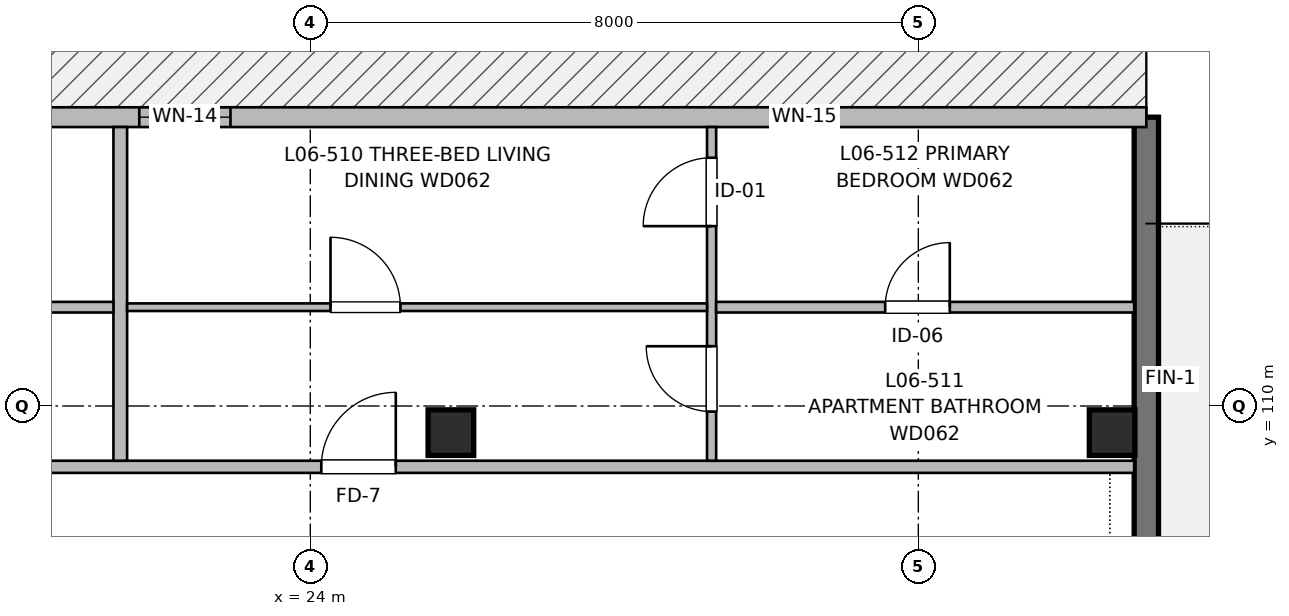
"""IFC4 building model, lengths in metres.
Left out: names, types, materials, properties, quantities, classifications, styles, units other than length and angle.
Written with IfcOpenShell. Run it as: python <this file> out.ifc"""

import sys

from ifc_helpers import new_model, si_unit, direction, frame, frame_2d, origin, origin_2d, place, context, subcontext, project, spatial, rectangle, extrude, element, fill, save


model = new_model("IFC4")
c1 = context("Model", 3, precision=1e-05, world=origin(), true_north=direction((0.0, 1.0)))
c2 = subcontext(c1, "Body", "Model", "MODEL_VIEW")
j1 = project(units=[si_unit("LENGTHUNIT", "METRE"), si_unit("PLANEANGLEUNIT", "RADIAN")], contexts=[c1])
p1 = place(None, origin())
s1 = spatial("IfcSite", under=j1, at=p1, CompositionType="ELEMENT")
p2 = place(p1, origin())
s2 = spatial("IfcBuilding", under=s1, at=p2, CompositionType="ELEMENT")
p3 = place(p2, frame((0.0, 0.0, 20.16)))
s3 = spatial("IfcBuildingStorey", under=s2, at=p3, CompositionType="ELEMENT", Elevation=20.16)
for number, where, z_axis, x_axis in (
    (1, (25.85, 109.65, 0.0), (0.0, 0.0, 1.0), (1.0, 0.0, 0.0)),
    (2, (34.55, 109.65, 0.0), (0.0, 0.0, 1.0), (1.0, 0.0, 0.0)),
):
    element("IfcColumn", number, at=place(p3, frame(where, z_axis=z_axis, x_axis=x_axis)), inside=s3, PredefinedType="COLUMN", context=c2, shape_type="SweptSolid", body=[
        extrude(rectangle(XDim=0.6, YDim=0.6, at=origin_2d()), origin(), (0.0, 0.0, 1.0), 3.2),
    ])
p4 = place(p3, frame((35.0, 113.8, 0.0), z_axis=(0.0, 0.0, 1.0), x_axis=(0.0, -1.0, 0.0)))
e3 = element("IfcWall", 3, at=p4, inside=s3, PredefinedType="SHEAR", context=c2, shape_type="SweptSolid", body=[
    extrude(rectangle(XDim=13.8, YDim=0.32, at=frame_2d((6.9, 0.0))), origin(), (0.0, 0.0, 1.0), 2.98),
])
p5 = place(p4, frame((6.3, 0.0, 0.0)))
e4 = element("IfcOpeningElement", 4, at=p5, cuts=e3, PredefinedType="OPENING", context=c2, shape_type="SweptSolid", body=[
    extrude(rectangle(XDim=1.2, YDim=2.2, at=frame_2d((0.6, 1.1))), frame((0.0, 0.17, 0.0), z_axis=(0.0, -1.0, 0.0), x_axis=(1.0, 0.0, 0.0)), (0.0, 0.0, 1.0), 0.34),
])
p6 = place(p4, frame((8.2, 0.0, 0.57)))
e5 = element("IfcOpeningElement", 5, at=p6, cuts=e3, PredefinedType="OPENING", context=c2, shape_type="SweptSolid", body=[
    extrude(rectangle(XDim=2.3, YDim=1.65, at=frame_2d((1.15, 0.825))), frame((0.0, 0.17, 0.0), z_axis=(0.0, -1.0, 0.0), x_axis=(1.0, 0.0, 0.0)), (0.0, 0.0, 1.0), 0.34),
])
p7 = place(p3, frame((8.0, 113.8, 0.0), z_axis=(0.0, 0.0, 1.0), x_axis=(1.0, 0.0, 0.0)))
e6 = element("IfcWall", 6, at=p7, inside=s3, PredefinedType="SOLIDWALL", context=c2, shape_type="SweptSolid", body=[
    extrude(rectangle(XDim=27.0, YDim=0.26, at=frame_2d((13.5, 0.0))), origin(), (0.0, 0.0, 1.0), 2.98),
])
p8 = place(p7, frame((5.5, 0.0, 0.0)))
e7 = element("IfcOpeningElement", 7, at=p8, cuts=e6, PredefinedType="OPENING", context=c2, shape_type="SweptSolid", body=[
    extrude(rectangle(XDim=1.35, YDim=2.2, at=frame_2d((0.675, 1.1))), frame((0.0, 0.14, 0.0), z_axis=(0.0, -1.0, 0.0), x_axis=(1.0, 0.0, 0.0)), (0.0, 0.0, 1.0), 0.28),
])
p9 = place(p7, frame((3.975, 0.0, 0.9)))
e8 = element("IfcOpeningElement", 8, at=p9, cuts=e6, PredefinedType="OPENING", context=c2, shape_type="SweptSolid", body=[
    extrude(rectangle(XDim=1.05, YDim=1.15, at=frame_2d((0.525, 0.575))), frame((0.0, 0.14, 0.0), z_axis=(0.0, -1.0, 0.0), x_axis=(1.0, 0.0, 0.0)), (0.0, 0.0, 1.0), 0.28),
])
p10 = place(p7, frame((13.75, 0.0, 0.9)))
e9 = element("IfcOpeningElement", 9, at=p10, cuts=e6, PredefinedType="OPENING", context=c2, shape_type="SweptSolid", body=[
    extrude(rectangle(XDim=1.2, YDim=1.05, at=frame_2d((0.6, 0.525))), frame((0.0, 0.14, 0.0), z_axis=(0.0, -1.0, 0.0), x_axis=(1.0, 0.0, 0.0)), (0.0, 0.0, 1.0), 0.28),
])
p11 = place(p7, frame((22.175, 0.0, 0.9)))
e10 = element("IfcOpeningElement", 10, at=p11, cuts=e6, PredefinedType="OPENING", context=c2, shape_type="SweptSolid", body=[
    extrude(rectangle(XDim=0.65, YDim=0.95, at=frame_2d((0.325, 0.475))), frame((0.0, 0.14, 0.0), z_axis=(0.0, -1.0, 0.0), x_axis=(1.0, 0.0, 0.0)), (0.0, 0.0, 1.0), 0.28),
])
p12 = place(p7, frame((9.9, 0.0, 0.82)))
e11 = element("IfcOpeningElement", 11, at=p12, cuts=e6, PredefinedType="OPENING", context=c2, shape_type="SweptSolid", body=[
    extrude(rectangle(XDim=1.5, YDim=1.4, at=frame_2d((0.75, 0.7))), frame((0.0, 0.14, 0.0), z_axis=(0.0, -1.0, 0.0), x_axis=(1.0, 0.0, 0.0)), (0.0, 0.0, 1.0), 0.28),
])
p13 = place(p3, frame((8.16, 109.2, 0.0), z_axis=(0.0, 0.0, 1.0), x_axis=(1.0, 0.0, 0.0)))
e12 = element("IfcWall", 12, at=p13, inside=s3, PredefinedType="PARTITIONING", context=c2, shape_type="SweptSolid", body=[
    extrude(rectangle(XDim=26.68, YDim=0.16, at=frame_2d((13.34, 0.0))), origin(), (0.0, 0.0, 1.0), 2.935),
])
p14 = place(p13, frame((3.35, 0.0, 0.0)))
e13 = element("IfcOpeningElement", 13, at=p14, cuts=e12, PredefinedType="OPENING", context=c2, shape_type="SweptSolid", body=[
    extrude(rectangle(XDim=0.98, YDim=2.15, at=frame_2d((0.49, 1.075))), frame((0.0, 0.09, 0.0), z_axis=(0.0, -1.0, 0.0), x_axis=(1.0, 0.0, 0.0)), (0.0, 0.0, 1.0), 0.18),
])
p15 = place(p13, frame((15.985, 0.0, 0.0)))
e14 = element("IfcOpeningElement", 14, at=p15, cuts=e12, PredefinedType="OPENING", context=c2, shape_type="SweptSolid", body=[
    extrude(rectangle(XDim=0.98, YDim=2.15, at=frame_2d((0.49, 1.075))), frame((0.0, 0.09, 0.0), z_axis=(0.0, -1.0, 0.0), x_axis=(1.0, 0.0, 0.0)), (0.0, 0.0, 1.0), 0.18),
])
p16 = place(p3, frame((21.5, 109.28, 0.0), z_axis=(0.0, 0.0, 1.0), x_axis=(0.0, 1.0, 0.0)))
e15 = element("IfcWall", 15, at=p16, inside=s3, PredefinedType="PARTITIONING", context=c2, shape_type="SweptSolid", body=[
    extrude(rectangle(XDim=4.39, YDim=0.18, at=frame_2d((2.195, 0.0))), origin(), (0.0, 0.0, 1.0), 2.935),
])
p17 = place(p3, frame((15.9, 111.3, 0.0), z_axis=(0.0, 0.0, 1.0), x_axis=(1.0, 0.0, 0.0)))
e16 = element("IfcWall", 16, at=p17, inside=s3, PredefinedType="PARTITIONING", context=c2, shape_type="SweptSolid", body=[
    extrude(rectangle(XDim=5.51, YDim=0.14, at=frame_2d((2.755, 0.0))), origin(), (0.0, 0.0, 1.0), 2.935),
])
p18 = place(p17, frame((2.228, 0.0, 0.0)))
e17 = element("IfcOpeningElement", 17, at=p18, cuts=e16, PredefinedType="OPENING", context=c2, shape_type="SweptSolid", body=[
    extrude(rectangle(XDim=0.85, YDim=2.05, at=frame_2d((0.425, 1.025))), frame((0.0, 0.08, 0.0), z_axis=(0.0, -1.0, 0.0), x_axis=(1.0, 0.0, 0.0)), (0.0, 0.0, 1.0), 0.16),
])
p19 = place(p3, frame((29.28, 109.28, 0.0), z_axis=(0.0, 0.0, 1.0), x_axis=(0.0, 1.0, 0.0)))
e18 = element("IfcWall", 18, at=p19, inside=s3, PredefinedType="PARTITIONING", context=c2, shape_type="SweptSolid", body=[
    extrude(rectangle(XDim=4.39, YDim=0.12, at=frame_2d((2.195, 0.0))), origin(), (0.0, 0.0, 1.0), 2.935),
])
p20 = place(p19, frame((0.646, 0.0, 0.0)))
e19 = element("IfcOpeningElement", 19, at=p20, cuts=e18, PredefinedType="OPENING", context=c2, shape_type="SweptSolid", body=[
    extrude(rectangle(XDim=0.86, YDim=2.1, at=frame_2d((0.43, 1.05))), frame((0.0, 0.07, 0.0), z_axis=(0.0, -1.0, 0.0), x_axis=(1.0, 0.0, 0.0)), (0.0, 0.0, 1.0), 0.14),
])
p21 = place(p19, frame((3.086, 0.0, 0.0)))
e20 = element("IfcOpeningElement", 20, at=p21, cuts=e18, PredefinedType="OPENING", context=c2, shape_type="SweptSolid", body=[
    extrude(rectangle(XDim=0.9, YDim=2.1, at=frame_2d((0.45, 1.05))), frame((0.0, 0.07, 0.0), z_axis=(0.0, -1.0, 0.0), x_axis=(1.0, 0.0, 0.0)), (0.0, 0.0, 1.0), 0.14),
])
p22 = place(p3, frame((29.34, 111.3, 0.0), z_axis=(0.0, 0.0, 1.0), x_axis=(1.0, 0.0, 0.0)))
e21 = element("IfcWall", 21, at=p22, inside=s3, PredefinedType="PARTITIONING", context=c2, shape_type="SweptSolid", body=[
    extrude(rectangle(XDim=5.5, YDim=0.14, at=frame_2d((2.75, 0.0))), origin(), (0.0, 0.0, 1.0), 2.935),
])
p23 = place(p22, frame((2.224, 0.0, 0.0)))
e22 = element("IfcOpeningElement", 22, at=p23, cuts=e21, PredefinedType="OPENING", context=c2, shape_type="SweptSolid", body=[
    extrude(rectangle(XDim=0.85, YDim=2.05, at=frame_2d((0.425, 1.025))), frame((0.0, 0.08, 0.0), z_axis=(0.0, -1.0, 0.0), x_axis=(1.0, 0.0, 0.0)), (0.0, 0.0, 1.0), 0.16),
])
p24 = place(p3, frame((21.59, 111.3, 0.0), z_axis=(0.0, 0.0, 1.0), x_axis=(1.0, 0.0, 0.0)))
e23 = element("IfcWall", 23, at=p24, inside=s3, PredefinedType="PARTITIONING", context=c2, shape_type="SweptSolid", body=[
    extrude(rectangle(XDim=7.63, YDim=0.1, at=frame_2d((3.815, 0.0))), origin(), (0.0, 0.0, 1.0), 2.935),
])
p25 = place(p24, frame((2.676, 0.0, 0.0)))
e24 = element("IfcOpeningElement", 24, at=p25, cuts=e23, PredefinedType="OPENING", context=c2, shape_type="SweptSolid", body=[
    extrude(rectangle(XDim=0.92, YDim=2.1, at=frame_2d((0.46, 1.05))), frame((0.0, 0.06, 0.0), z_axis=(0.0, -1.0, 0.0), x_axis=(1.0, 0.0, 0.0)), (0.0, 0.0, 1.0), 0.12),
])
p26 = place(p10, origin())
e25 = element("IfcWindow", 25, at=p26, inside=s3, PartitioningType="SINGLE_PANEL", PredefinedType="WINDOW", context=c2, shape_type="SweptSolid", body=[
    extrude(rectangle(XDim=1.2, YDim=1.05, at=frame_2d((0.6, 0.525))), frame((0.0, 0.03, 0.0), z_axis=(0.0, -1.0, 0.0), x_axis=(1.0, 0.0, 0.0)), (0.0, 0.0, 1.0), 0.06),
])
fill(e9, e25)
p27 = place(p11, origin())
e26 = element("IfcWindow", 26, at=p27, inside=s3, PartitioningType="SINGLE_PANEL", PredefinedType="WINDOW", context=c2, shape_type="SweptSolid", body=[
    extrude(rectangle(XDim=0.65, YDim=0.95, at=frame_2d((0.325, 0.475))), frame((0.0, 0.03, 0.0), z_axis=(0.0, -1.0, 0.0), x_axis=(1.0, 0.0, 0.0)), (0.0, 0.0, 1.0), 0.06),
])
fill(e10, e26)
p28 = place(p15, origin())
e27 = element("IfcDoor", 27, at=p28, inside=s3, OperationType="SINGLE_SWING_RIGHT", PredefinedType="DOOR", context=c2, shape_type="SweptSolid", body=[
    extrude(rectangle(XDim=0.98, YDim=2.15, at=frame_2d((0.49, 1.075))), frame((0.0, 0.025, 0.0), z_axis=(0.0, -1.0, 0.0), x_axis=(1.0, 0.0, 0.0)), (0.0, 0.0, 1.0), 0.05),
])
fill(e14, e27)
p29 = place(p25, origin())
e28 = element("IfcDoor", 28, at=p29, inside=s3, OperationType="SINGLE_SWING_LEFT", PredefinedType="DOOR", context=c2, shape_type="SweptSolid", body=[
    extrude(rectangle(XDim=0.92, YDim=2.1, at=frame_2d((0.46, 1.05))), frame((0.0, 0.025, 0.0), z_axis=(0.0, -1.0, 0.0), x_axis=(1.0, 0.0, 0.0)), (0.0, 0.0, 1.0), 0.05),
])
fill(e24, e28)
p30 = place(p20, origin())
e29 = element("IfcDoor", 29, at=p30, inside=s3, OperationType="SINGLE_SWING_RIGHT", PredefinedType="DOOR", context=c2, shape_type="SweptSolid", body=[
    extrude(rectangle(XDim=0.86, YDim=2.1, at=frame_2d((0.43, 1.05))), frame((0.0, 0.025, 0.0), z_axis=(0.0, -1.0, 0.0), x_axis=(1.0, 0.0, 0.0)), (0.0, 0.0, 1.0), 0.05),
])
fill(e19, e29)
p31 = place(p21, origin())
e30 = element("IfcDoor", 30, at=p31, inside=s3, OperationType="SINGLE_SWING_LEFT", PredefinedType="DOOR", context=c2, shape_type="SweptSolid", body=[
    extrude(rectangle(XDim=0.9, YDim=2.1, at=frame_2d((0.45, 1.05))), frame((0.0, 0.025, 0.0), z_axis=(0.0, -1.0, 0.0), x_axis=(1.0, 0.0, 0.0)), (0.0, 0.0, 1.0), 0.05),
])
fill(e20, e30)
p32 = place(p23, origin())
e31 = element("IfcDoor", 31, at=p32, inside=s3, OperationType="SINGLE_SWING_RIGHT", PredefinedType="DOOR", context=c2, shape_type="SweptSolid", body=[
    extrude(rectangle(XDim=0.85, YDim=2.05, at=frame_2d((0.425, 1.025))), frame((0.0, 0.025, 0.0), z_axis=(0.0, -1.0, 0.0), x_axis=(1.0, 0.0, 0.0)), (0.0, 0.0, 1.0), 0.05),
])
fill(e22, e31)
save(model, sys.argv[1])
